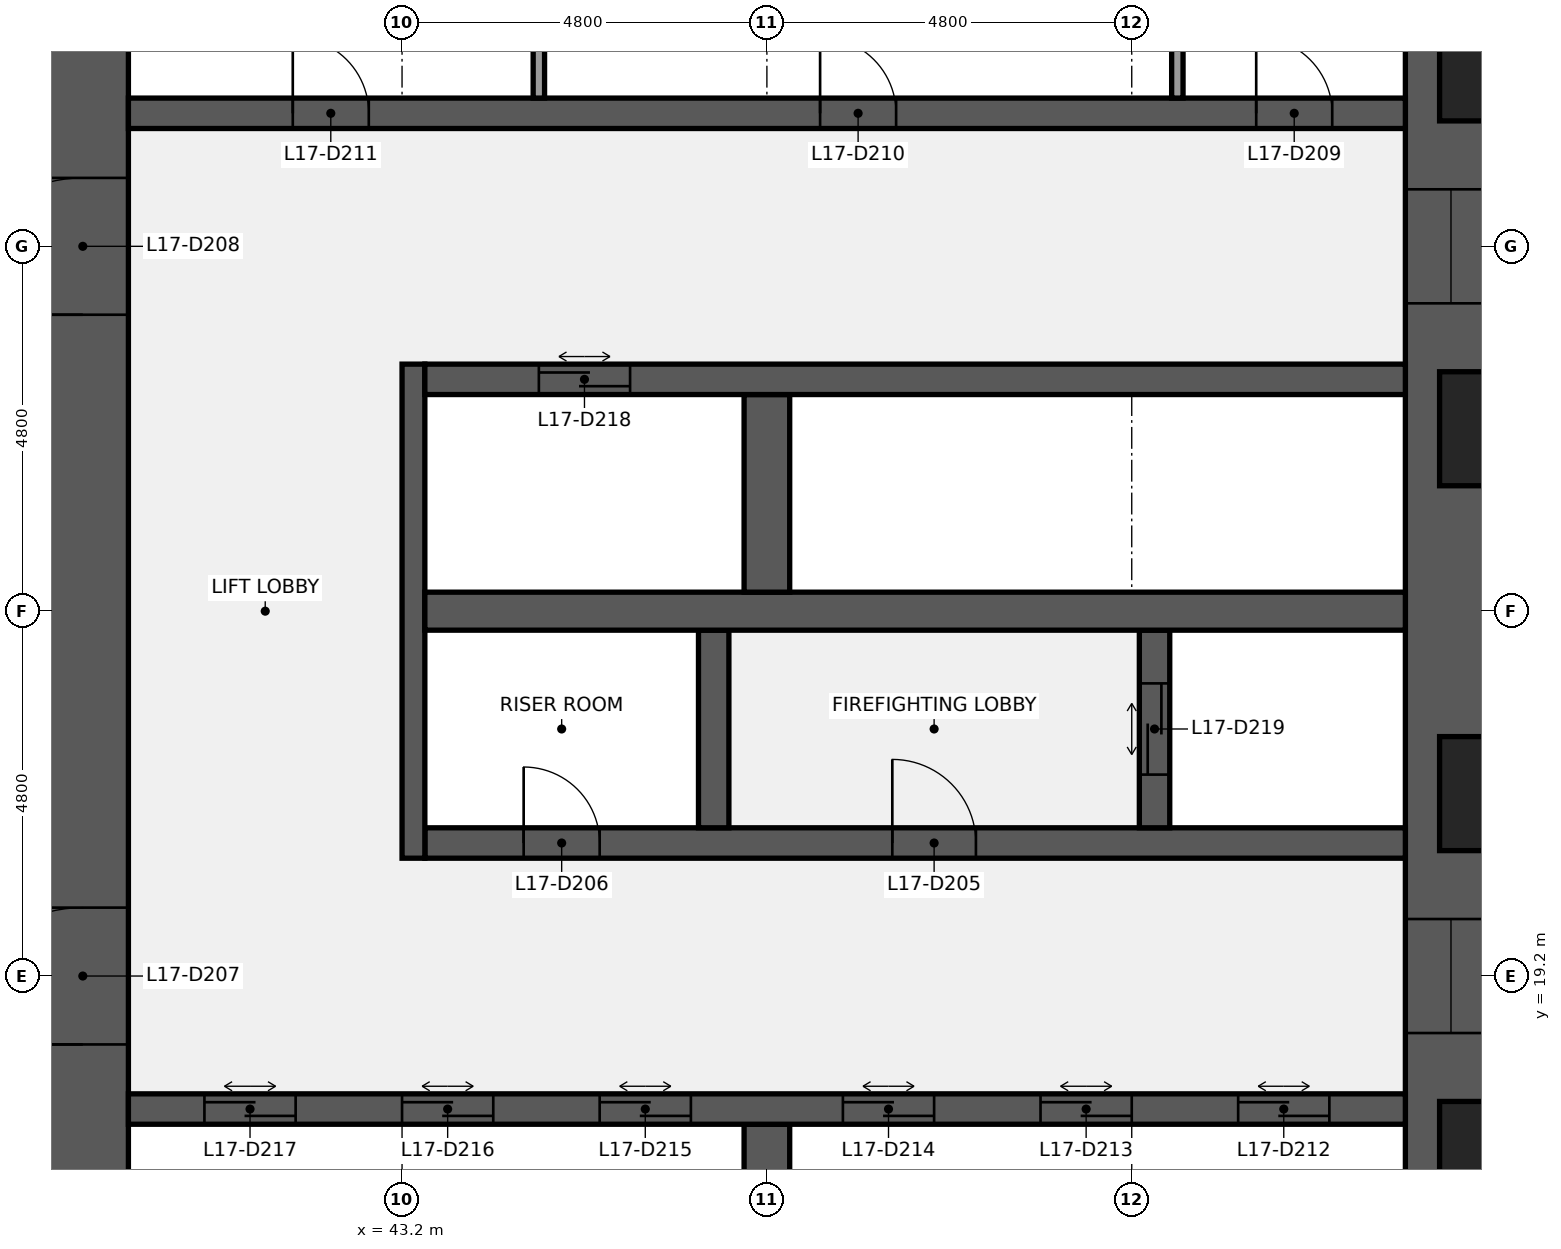
"""IFC4 building model, lengths in metres.
Left out: names, types, materials, properties, quantities, classifications, styles, units other than length and angle.
Written with IfcOpenShell. Run it as: python <this file> out.ifc"""

import sys

from ifc_helpers import new_model, si_unit, direction, frame, frame_2d, origin, place, context, subcontext, project, spatial, rectangle, extrude, element, fill, save


model = new_model("IFC4")
c1 = context("Model", 3, precision=1e-05, world=origin(), true_north=direction((0.0, 1.0)))
c2 = subcontext(c1, "Body", "Model", "MODEL_VIEW")
j1 = project(units=[si_unit("LENGTHUNIT", "METRE"), si_unit("PLANEANGLEUNIT", "RADIAN")], contexts=[c1])
p1 = place(None, origin())
s1 = spatial("IfcSite", under=j1, at=p1, CompositionType="ELEMENT")
p2 = place(p1, origin())
s2 = spatial("IfcBuilding", under=s1, at=p2, CompositionType="ELEMENT")
p3 = place(p2, frame((0.0, 0.0, 79.0)))
s3 = spatial("IfcBuildingStorey", under=s2, at=p3, CompositionType="ELEMENT", Elevation=79.0)
p4 = place(p3, frame((57.0, 38.4, 0.0), z_axis=(0.0, 0.0, 1.0), x_axis=(0.0, -1.0, 0.0)))
e1 = element("IfcWall", 1, at=p4, inside=s3, PredefinedType="SHEAR", context=c2, shape_type="SweptSolid", body=[
    extrude(rectangle(XDim=28.8, YDim=1.2, at=frame_2d((14.4, 0.0))), origin(), (0.0, 0.0, 1.0), 3.84),
])
p5 = place(p4, frame((18.45, 0.0, 0.9)))
e2 = element("IfcOpeningElement", 2, at=p5, cuts=e1, PredefinedType="OPENING", context=c2, shape_type="SweptSolid", body=[
    extrude(rectangle(XDim=1.5, YDim=1.5, at=frame_2d((0.75, 0.75))), frame((0.0, 0.61, 0.0), z_axis=(0.0, -1.0, 0.0), x_axis=(1.0, 0.0, 0.0)), (0.0, 0.0, 1.0), 1.22),
])
p6 = place(p4, frame((8.85, 0.0, 0.9)))
e3 = element("IfcOpeningElement", 3, at=p6, cuts=e1, PredefinedType="OPENING", context=c2, shape_type="SweptSolid", body=[
    extrude(rectangle(XDim=1.5, YDim=1.5, at=frame_2d((0.75, 0.75))), frame((0.0, 0.61, 0.0), z_axis=(0.0, -1.0, 0.0), x_axis=(1.0, 0.0, 0.0)), (0.0, 0.0, 1.0), 1.22),
])
p7 = place(p3, frame((39.0, 9.6, 0.0), z_axis=(0.0, 0.0, 1.0), x_axis=(0.0, 1.0, 0.0)))
e4 = element("IfcWall", 4, at=p7, inside=s3, PredefinedType="SHEAR", context=c2, shape_type="SweptSolid", body=[
    extrude(rectangle(XDim=28.8, YDim=1.2, at=frame_2d((14.4, 0.0))), origin(), (0.0, 0.0, 1.0), 3.84),
])
p8 = place(p7, frame((8.7, 0.0, 0.0)))
e5 = element("IfcOpeningElement", 5, at=p8, cuts=e4, PredefinedType="OPENING", context=c2, shape_type="SweptSolid", body=[
    extrude(rectangle(XDim=1.8, YDim=2.1, at=frame_2d((0.9, 1.05))), frame((0.0, 0.61, 0.0), z_axis=(0.0, -1.0, 0.0), x_axis=(1.0, 0.0, 0.0)), (0.0, 0.0, 1.0), 1.22),
])
p9 = place(p7, frame((18.3, 0.0, 0.0)))
e6 = element("IfcOpeningElement", 6, at=p9, cuts=e4, PredefinedType="OPENING", context=c2, shape_type="SweptSolid", body=[
    extrude(rectangle(XDim=1.8, YDim=2.1, at=frame_2d((0.9, 1.05))), frame((0.0, 0.61, 0.0), z_axis=(0.0, -1.0, 0.0), x_axis=(1.0, 0.0, 0.0)), (0.0, 0.0, 1.0), 1.22),
])
p10 = place(p3, frame((48.0, 14.65, 0.0), z_axis=(0.0, 0.0, 1.0), x_axis=(0.0, 1.0, 0.0)))
e7 = element("IfcWall", 7, at=p10, inside=s3, PredefinedType="SHEAR", context=c2, shape_type="SweptSolid", body=[
    extrude(rectangle(XDim=2.6, YDim=0.6, at=frame_2d((1.3, 0.0))), origin(), (0.0, 0.0, 1.0), 3.84),
])
p11 = place(p3, frame((39.6, 17.45, 0.0), z_axis=(0.0, 0.0, 1.0), x_axis=(1.0, 0.0, 0.0)))
e8 = element("IfcWall", 8, at=p11, inside=s3, PredefinedType="SHEAR", context=c2, shape_type="SweptSolid", body=[
    extrude(rectangle(XDim=16.8, YDim=0.4, at=frame_2d((8.4, 0.0))), origin(), (0.0, 0.0, 1.0), 3.84),
])
p12 = place(p11, frame((14.6, 0.0, 0.0)))
e9 = element("IfcOpeningElement", 9, at=p12, cuts=e8, PredefinedType="OPENING", context=c2, shape_type="SweptSolid", body=[
    extrude(rectangle(XDim=1.2, YDim=2.1, at=frame_2d((0.6, 1.05))), frame((0.0, 0.21, 0.0), z_axis=(0.0, -1.0, 0.0), x_axis=(1.0, 0.0, 0.0)), (0.0, 0.0, 1.0), 0.42),
])
p13 = place(p11, frame((12.0, 0.0, 0.0)))
e10 = element("IfcOpeningElement", 10, at=p13, cuts=e8, PredefinedType="OPENING", context=c2, shape_type="SweptSolid", body=[
    extrude(rectangle(XDim=1.2, YDim=2.1, at=frame_2d((0.6, 1.05))), frame((0.0, 0.21, 0.0), z_axis=(0.0, -1.0, 0.0), x_axis=(1.0, 0.0, 0.0)), (0.0, 0.0, 1.0), 0.42),
])
p14 = place(p11, frame((9.4, 0.0, 0.0)))
e11 = element("IfcOpeningElement", 11, at=p14, cuts=e8, PredefinedType="OPENING", context=c2, shape_type="SweptSolid", body=[
    extrude(rectangle(XDim=1.2, YDim=2.1, at=frame_2d((0.6, 1.05))), frame((0.0, 0.21, 0.0), z_axis=(0.0, -1.0, 0.0), x_axis=(1.0, 0.0, 0.0)), (0.0, 0.0, 1.0), 0.42),
])
p15 = place(p11, frame((6.2, 0.0, 0.0)))
e12 = element("IfcOpeningElement", 12, at=p15, cuts=e8, PredefinedType="OPENING", context=c2, shape_type="SweptSolid", body=[
    extrude(rectangle(XDim=1.2, YDim=2.1, at=frame_2d((0.6, 1.05))), frame((0.0, 0.21, 0.0), z_axis=(0.0, -1.0, 0.0), x_axis=(1.0, 0.0, 0.0)), (0.0, 0.0, 1.0), 0.42),
])
p16 = place(p11, frame((3.6, 0.0, 0.0)))
e13 = element("IfcOpeningElement", 13, at=p16, cuts=e8, PredefinedType="OPENING", context=c2, shape_type="SweptSolid", body=[
    extrude(rectangle(XDim=1.2, YDim=2.1, at=frame_2d((0.6, 1.05))), frame((0.0, 0.21, 0.0), z_axis=(0.0, -1.0, 0.0), x_axis=(1.0, 0.0, 0.0)), (0.0, 0.0, 1.0), 0.42),
])
p17 = place(p11, frame((1.0, 0.0, 0.0)))
e14 = element("IfcOpeningElement", 14, at=p17, cuts=e8, PredefinedType="OPENING", context=c2, shape_type="SweptSolid", body=[
    extrude(rectangle(XDim=1.2, YDim=2.1, at=frame_2d((0.6, 1.05))), frame((0.0, 0.21, 0.0), z_axis=(0.0, -1.0, 0.0), x_axis=(1.0, 0.0, 0.0)), (0.0, 0.0, 1.0), 0.42),
])
p18 = place(p3, frame((43.5, 20.95, 0.0), z_axis=(0.0, 0.0, 1.0), x_axis=(1.0, 0.0, 0.0)))
e15 = element("IfcWall", 15, at=p18, inside=s3, PredefinedType="SHEAR", context=c2, shape_type="SweptSolid", body=[
    extrude(rectangle(XDim=12.9, YDim=0.4, at=frame_2d((6.45, 0.0))), origin(), (0.0, 0.0, 1.0), 3.84),
])
p19 = place(p18, frame((6.15, 0.0, 0.0)))
e16 = element("IfcOpeningElement", 16, at=p19, cuts=e15, PredefinedType="OPENING", context=c2, shape_type="SweptSolid", body=[
    extrude(rectangle(XDim=1.1, YDim=2.1, at=frame_2d((0.55, 1.05))), frame((0.0, 0.21, 0.0), z_axis=(0.0, -1.0, 0.0), x_axis=(1.0, 0.0, 0.0)), (0.0, 0.0, 1.0), 0.42),
])
p20 = place(p18, frame((1.3, 0.0, 0.0)))
e17 = element("IfcOpeningElement", 17, at=p20, cuts=e15, PredefinedType="OPENING", context=c2, shape_type="SweptSolid", body=[
    extrude(rectangle(XDim=1.0, YDim=2.1, at=frame_2d((0.5, 1.05))), frame((0.0, 0.21, 0.0), z_axis=(0.0, -1.0, 0.0), x_axis=(1.0, 0.0, 0.0)), (0.0, 0.0, 1.0), 0.42),
])
p21 = place(p3, frame((43.35, 20.75, 0.0), z_axis=(0.0, 0.0, 1.0), x_axis=(0.0, 1.0, 0.0)))
e18 = element("IfcWall", 18, at=p21, inside=s3, PredefinedType="SHEAR", context=c2, shape_type="SweptSolid", body=[
    extrude(rectangle(XDim=6.5, YDim=0.3, at=frame_2d((3.25, 0.0))), origin(), (0.0, 0.0, 1.0), 3.84),
])
p22 = place(p3, frame((53.1, 21.15, 0.0), z_axis=(0.0, 0.0, 1.0), x_axis=(0.0, 1.0, 0.0)))
e19 = element("IfcWall", 19, at=p22, inside=s3, PredefinedType="SHEAR", context=c2, shape_type="SweptSolid", body=[
    extrude(rectangle(XDim=2.6, YDim=0.4, at=frame_2d((1.3, 0.0))), origin(), (0.0, 0.0, 1.0), 3.84),
])
p23 = place(p22, frame((0.7, 0.0, 0.0)))
e20 = element("IfcOpeningElement", 20, at=p23, cuts=e19, PredefinedType="OPENING", context=c2, shape_type="SweptSolid", body=[
    extrude(rectangle(XDim=1.2, YDim=2.1, at=frame_2d((0.6, 1.05))), frame((0.0, 0.21, 0.0), z_axis=(0.0, -1.0, 0.0), x_axis=(1.0, 0.0, 0.0)), (0.0, 0.0, 1.0), 0.42),
])
p24 = place(p3, frame((47.3, 21.15, 0.0), z_axis=(0.0, 0.0, 1.0), x_axis=(0.0, 1.0, 0.0)))
e21 = element("IfcWall", 21, at=p24, inside=s3, PredefinedType="SHEAR", context=c2, shape_type="SweptSolid", body=[
    extrude(rectangle(XDim=2.6, YDim=0.4, at=frame_2d((1.3, 0.0))), origin(), (0.0, 0.0, 1.0), 3.84),
])
p25 = place(p3, frame((43.5, 24.0, 0.0), z_axis=(0.0, 0.0, 1.0), x_axis=(1.0, 0.0, 0.0)))
e22 = element("IfcWall", 22, at=p25, inside=s3, PredefinedType="SHEAR", context=c2, shape_type="SweptSolid", body=[
    extrude(rectangle(XDim=12.9, YDim=0.5, at=frame_2d((6.45, 0.0))), origin(), (0.0, 0.0, 1.0), 3.84),
])
p26 = place(p3, frame((48.0, 24.25, 0.0), z_axis=(0.0, 0.0, 1.0), x_axis=(0.0, 1.0, 0.0)))
e23 = element("IfcWall", 23, at=p26, inside=s3, PredefinedType="SHEAR", context=c2, shape_type="SweptSolid", body=[
    extrude(rectangle(XDim=2.6, YDim=0.6, at=frame_2d((1.3, 0.0))), origin(), (0.0, 0.0, 1.0), 3.84),
])
p27 = place(p3, frame((43.5, 27.05, 0.0), z_axis=(0.0, 0.0, 1.0), x_axis=(1.0, 0.0, 0.0)))
e24 = element("IfcWall", 24, at=p27, inside=s3, PredefinedType="SHEAR", context=c2, shape_type="SweptSolid", body=[
    extrude(rectangle(XDim=12.9, YDim=0.4, at=frame_2d((6.45, 0.0))), origin(), (0.0, 0.0, 1.0), 3.84),
])
p28 = place(p27, frame((1.5, 0.0, 0.0)))
e25 = element("IfcOpeningElement", 25, at=p28, cuts=e24, PredefinedType="OPENING", context=c2, shape_type="SweptSolid", body=[
    extrude(rectangle(XDim=1.2, YDim=2.1, at=frame_2d((0.6, 1.05))), frame((0.0, 0.21, 0.0), z_axis=(0.0, -1.0, 0.0), x_axis=(1.0, 0.0, 0.0)), (0.0, 0.0, 1.0), 0.42),
])
p29 = place(p3, frame((39.6, 30.55, 0.0), z_axis=(0.0, 0.0, 1.0), x_axis=(1.0, 0.0, 0.0)))
e26 = element("IfcWall", 26, at=p29, inside=s3, PredefinedType="SHEAR", context=c2, shape_type="SweptSolid", body=[
    extrude(rectangle(XDim=16.8, YDim=0.4, at=frame_2d((8.4, 0.0))), origin(), (0.0, 0.0, 1.0), 3.84),
])
p30 = place(p29, frame((14.837, 0.0, 0.0)))
e27 = element("IfcOpeningElement", 27, at=p30, cuts=e26, PredefinedType="OPENING", context=c2, shape_type="SweptSolid", body=[
    extrude(rectangle(XDim=1.0, YDim=2.1, at=frame_2d((0.5, 1.05))), frame((0.0, 0.21, 0.0), z_axis=(0.0, -1.0, 0.0), x_axis=(1.0, 0.0, 0.0)), (0.0, 0.0, 1.0), 0.42),
])
p31 = place(p29, frame((9.1, 0.0, 0.0)))
e28 = element("IfcOpeningElement", 28, at=p31, cuts=e26, PredefinedType="OPENING", context=c2, shape_type="SweptSolid", body=[
    extrude(rectangle(XDim=1.0, YDim=2.1, at=frame_2d((0.5, 1.05))), frame((0.0, 0.21, 0.0), z_axis=(0.0, -1.0, 0.0), x_axis=(1.0, 0.0, 0.0)), (0.0, 0.0, 1.0), 0.42),
])
p32 = place(p29, frame((2.163, 0.0, 0.0)))
e29 = element("IfcOpeningElement", 29, at=p32, cuts=e26, PredefinedType="OPENING", context=c2, shape_type="SweptSolid", body=[
    extrude(rectangle(XDim=1.0, YDim=2.1, at=frame_2d((0.5, 1.05))), frame((0.0, 0.21, 0.0), z_axis=(0.0, -1.0, 0.0), x_axis=(1.0, 0.0, 0.0)), (0.0, 0.0, 1.0), 0.42),
])
for number, where, z_axis, x_axis in (
    (30, (53.4, 30.75, 0.0), (0.0, 0.0, 1.0), (0.0, 1.0, 0.0)),
    (31, (45.0, 30.75, 0.0), (0.0, 0.0, 1.0), (0.0, 1.0, 0.0)),
):
    element("IfcWall", number, at=place(p3, frame(where, z_axis=z_axis, x_axis=x_axis)), inside=s3, PredefinedType="PARTITIONING", context=c2, shape_type="SweptSolid", body=[
        extrude(rectangle(XDim=2.6, YDim=0.15, at=frame_2d((1.3, 0.0))), origin(), (0.0, 0.0, 1.0), 3.84),
    ])
p33 = place(p19, origin())
e32 = element("IfcDoor", 32, at=p33, inside=s3, OperationType="SINGLE_SWING_LEFT", PredefinedType="DOOR", context=c2, shape_type="SweptSolid", body=[
    extrude(rectangle(XDim=1.1, YDim=2.1, at=frame_2d((0.55, 1.05))), frame((0.0, 0.025, 0.0), z_axis=(0.0, -1.0, 0.0), x_axis=(1.0, 0.0, 0.0)), (0.0, 0.0, 1.0), 0.05),
])
fill(e16, e32)
p34 = place(p20, origin())
e33 = element("IfcDoor", 33, at=p34, inside=s3, OperationType="SINGLE_SWING_LEFT", PredefinedType="DOOR", context=c2, shape_type="SweptSolid", body=[
    extrude(rectangle(XDim=1.0, YDim=2.1, at=frame_2d((0.5, 1.05))), frame((0.0, 0.025, 0.0), z_axis=(0.0, -1.0, 0.0), x_axis=(1.0, 0.0, 0.0)), (0.0, 0.0, 1.0), 0.05),
])
fill(e17, e33)
p35 = place(p8, origin())
e34 = element("IfcDoor", 34, at=p35, inside=s3, OperationType="DOUBLE_DOOR_SINGLE_SWING", PredefinedType="DOOR", context=c2, shape_type="SweptSolid", body=[
    extrude(rectangle(XDim=1.8, YDim=2.1, at=frame_2d((0.9, 1.05))), frame((0.0, 0.025, 0.0), z_axis=(0.0, -1.0, 0.0), x_axis=(1.0, 0.0, 0.0)), (0.0, 0.0, 1.0), 0.05),
])
fill(e5, e34)
p36 = place(p9, origin())
e35 = element("IfcDoor", 35, at=p36, inside=s3, OperationType="DOUBLE_DOOR_SINGLE_SWING", PredefinedType="DOOR", context=c2, shape_type="SweptSolid", body=[
    extrude(rectangle(XDim=1.8, YDim=2.1, at=frame_2d((0.9, 1.05))), frame((0.0, 0.025, 0.0), z_axis=(0.0, -1.0, 0.0), x_axis=(1.0, 0.0, 0.0)), (0.0, 0.0, 1.0), 0.05),
])
fill(e6, e35)
p37 = place(p30, origin())
e36 = element("IfcDoor", 36, at=p37, inside=s3, OperationType="SINGLE_SWING_LEFT", PredefinedType="DOOR", context=c2, shape_type="SweptSolid", body=[
    extrude(rectangle(XDim=1.0, YDim=2.1, at=frame_2d((0.5, 1.05))), frame((0.0, 0.025, 0.0), z_axis=(0.0, -1.0, 0.0), x_axis=(1.0, 0.0, 0.0)), (0.0, 0.0, 1.0), 0.05),
])
fill(e27, e36)
p38 = place(p31, origin())
e37 = element("IfcDoor", 37, at=p38, inside=s3, OperationType="SINGLE_SWING_LEFT", PredefinedType="DOOR", context=c2, shape_type="SweptSolid", body=[
    extrude(rectangle(XDim=1.0, YDim=2.1, at=frame_2d((0.5, 1.05))), frame((0.0, 0.025, 0.0), z_axis=(0.0, -1.0, 0.0), x_axis=(1.0, 0.0, 0.0)), (0.0, 0.0, 1.0), 0.05),
])
fill(e28, e37)
p39 = place(p32, origin())
e38 = element("IfcDoor", 38, at=p39, inside=s3, OperationType="SINGLE_SWING_LEFT", PredefinedType="DOOR", context=c2, shape_type="SweptSolid", body=[
    extrude(rectangle(XDim=1.0, YDim=2.1, at=frame_2d((0.5, 1.05))), frame((0.0, 0.025, 0.0), z_axis=(0.0, -1.0, 0.0), x_axis=(1.0, 0.0, 0.0)), (0.0, 0.0, 1.0), 0.05),
])
fill(e29, e38)
p40 = place(p12, origin())
e39 = element("IfcDoor", 39, at=p40, inside=s3, OperationType="DOUBLE_DOOR_SLIDING", PredefinedType="DOOR", context=c2, shape_type="SweptSolid", body=[
    extrude(rectangle(XDim=1.2, YDim=2.1, at=frame_2d((0.6, 1.05))), frame((0.0, 0.025, 0.0), z_axis=(0.0, -1.0, 0.0), x_axis=(1.0, 0.0, 0.0)), (0.0, 0.0, 1.0), 0.05),
])
fill(e9, e39)
p41 = place(p13, origin())
e40 = element("IfcDoor", 40, at=p41, inside=s3, OperationType="DOUBLE_DOOR_SLIDING", PredefinedType="DOOR", context=c2, shape_type="SweptSolid", body=[
    extrude(rectangle(XDim=1.2, YDim=2.1, at=frame_2d((0.6, 1.05))), frame((0.0, 0.025, 0.0), z_axis=(0.0, -1.0, 0.0), x_axis=(1.0, 0.0, 0.0)), (0.0, 0.0, 1.0), 0.05),
])
fill(e10, e40)
p42 = place(p14, origin())
e41 = element("IfcDoor", 41, at=p42, inside=s3, OperationType="DOUBLE_DOOR_SLIDING", PredefinedType="DOOR", context=c2, shape_type="SweptSolid", body=[
    extrude(rectangle(XDim=1.2, YDim=2.1, at=frame_2d((0.6, 1.05))), frame((0.0, 0.025, 0.0), z_axis=(0.0, -1.0, 0.0), x_axis=(1.0, 0.0, 0.0)), (0.0, 0.0, 1.0), 0.05),
])
fill(e11, e41)
p43 = place(p15, origin())
e42 = element("IfcDoor", 42, at=p43, inside=s3, OperationType="DOUBLE_DOOR_SLIDING", PredefinedType="DOOR", context=c2, shape_type="SweptSolid", body=[
    extrude(rectangle(XDim=1.2, YDim=2.1, at=frame_2d((0.6, 1.05))), frame((0.0, 0.025, 0.0), z_axis=(0.0, -1.0, 0.0), x_axis=(1.0, 0.0, 0.0)), (0.0, 0.0, 1.0), 0.05),
])
fill(e12, e42)
p44 = place(p16, origin())
e43 = element("IfcDoor", 43, at=p44, inside=s3, OperationType="DOUBLE_DOOR_SLIDING", PredefinedType="DOOR", context=c2, shape_type="SweptSolid", body=[
    extrude(rectangle(XDim=1.2, YDim=2.1, at=frame_2d((0.6, 1.05))), frame((0.0, 0.025, 0.0), z_axis=(0.0, -1.0, 0.0), x_axis=(1.0, 0.0, 0.0)), (0.0, 0.0, 1.0), 0.05),
])
fill(e13, e43)
p45 = place(p17, origin())
e44 = element("IfcDoor", 44, at=p45, inside=s3, OperationType="DOUBLE_DOOR_SLIDING", PredefinedType="DOOR", context=c2, shape_type="SweptSolid", body=[
    extrude(rectangle(XDim=1.2, YDim=2.1, at=frame_2d((0.6, 1.05))), frame((0.0, 0.025, 0.0), z_axis=(0.0, -1.0, 0.0), x_axis=(1.0, 0.0, 0.0)), (0.0, 0.0, 1.0), 0.05),
])
fill(e14, e44)
p46 = place(p28, origin())
e45 = element("IfcDoor", 45, at=p46, inside=s3, OperationType="DOUBLE_DOOR_SLIDING", PredefinedType="DOOR", context=c2, shape_type="SweptSolid", body=[
    extrude(rectangle(XDim=1.2, YDim=2.1, at=frame_2d((0.6, 1.05))), frame((0.0, 0.025, 0.0), z_axis=(0.0, -1.0, 0.0), x_axis=(1.0, 0.0, 0.0)), (0.0, 0.0, 1.0), 0.05),
])
fill(e25, e45)
p47 = place(p23, origin())
e46 = element("IfcDoor", 46, at=p47, inside=s3, OperationType="DOUBLE_DOOR_SLIDING", PredefinedType="DOOR", context=c2, shape_type="SweptSolid", body=[
    extrude(rectangle(XDim=1.2, YDim=2.1, at=frame_2d((0.6, 1.05))), frame((0.0, 0.025, 0.0), z_axis=(0.0, -1.0, 0.0), x_axis=(1.0, 0.0, 0.0)), (0.0, 0.0, 1.0), 0.05),
])
fill(e20, e46)
p48 = place(p5, origin())
e47 = element("IfcWindow", 47, at=p48, inside=s3, PartitioningType="SINGLE_PANEL", PredefinedType="WINDOW", context=c2, shape_type="SweptSolid", body=[
    extrude(rectangle(XDim=1.5, YDim=1.5, at=frame_2d((0.75, 0.75))), frame((0.0, 0.03, 0.0), z_axis=(0.0, -1.0, 0.0), x_axis=(1.0, 0.0, 0.0)), (0.0, 0.0, 1.0), 0.06),
])
fill(e2, e47)
p49 = place(p6, origin())
e48 = element("IfcWindow", 48, at=p49, inside=s3, PartitioningType="SINGLE_PANEL", PredefinedType="WINDOW", context=c2, shape_type="SweptSolid", body=[
    extrude(rectangle(XDim=1.5, YDim=1.5, at=frame_2d((0.75, 0.75))), frame((0.0, 0.03, 0.0), z_axis=(0.0, -1.0, 0.0), x_axis=(1.0, 0.0, 0.0)), (0.0, 0.0, 1.0), 0.06),
])
fill(e3, e48)
save(model, sys.argv[1])
